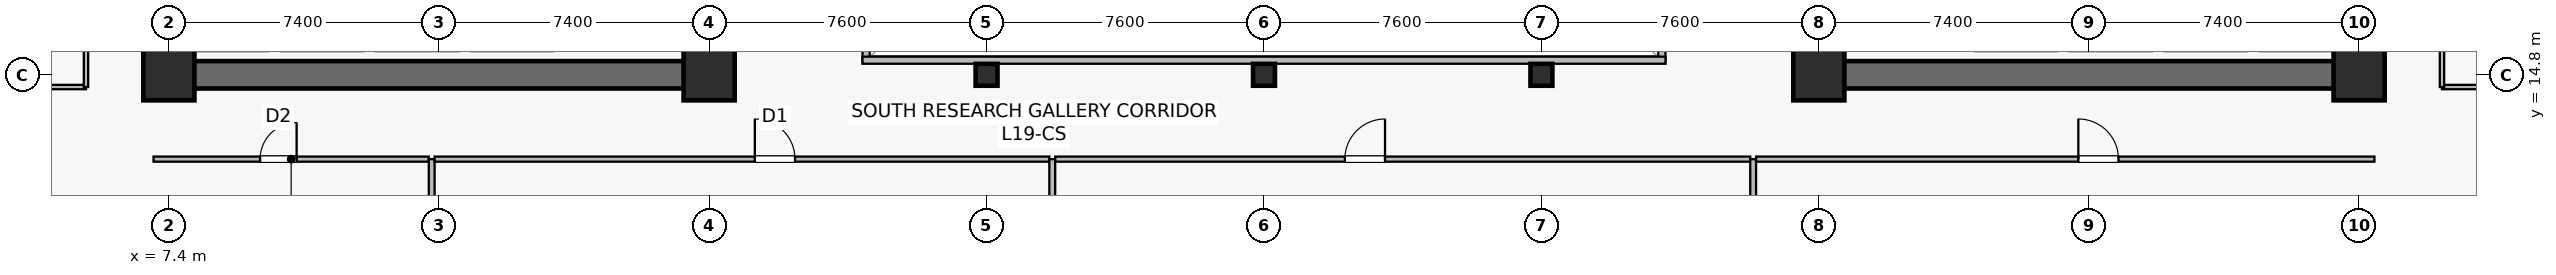
"""IFC4 building model, lengths in metres.
Left out: names, types, materials, properties, quantities, classifications, styles, units other than length and angle.
Written with IfcOpenShell. Run it as: python <this file> out.ifc"""

import sys

from ifc_helpers import new_model, si_unit, direction, frame, frame_2d, origin, origin_2d, place, context, subcontext, project, spatial, rectangle, hollow_rectangle, extrude, source, transform, mapped, element, fill, save


model = new_model("IFC4")
c1 = context("Model", 3, precision=1e-05, world=origin(), true_north=direction((0.0, 1.0)))
c2 = subcontext(c1, "Body", "Model", "MODEL_VIEW")
j1 = project(units=[si_unit("LENGTHUNIT", "METRE"), si_unit("PLANEANGLEUNIT", "RADIAN")], contexts=[c1])
p1 = place(None, origin())
s1 = spatial("IfcSite", under=j1, at=p1, CompositionType="ELEMENT")
p2 = place(p1, origin())
s2 = spatial("IfcBuilding", under=s1, at=p2, CompositionType="ELEMENT")
p3 = place(p2, frame((0.0, 0.0, 78.5)))
s3 = spatial("IfcBuildingStorey", under=s2, at=p3, CompositionType="ELEMENT", Elevation=78.5)
p4 = place(p3, frame((7.025, 14.8, 0.0), z_axis=(0.0, 0.0, 1.0), x_axis=(1.0, 0.0, 0.0)))
e1 = element("IfcWall", 1, at=p4, inside=s3, PredefinedType="SHEAR", context=c2, shape_type="SweptSolid", body=[
    extrude(rectangle(XDim=15.55, YDim=0.75, at=frame_2d((7.775, 0.0))), origin(), (0.0, 0.0, 1.0), 3.78),
])
p5 = place(p3, frame((7.4, 15.175, 0.0), z_axis=(0.0, 0.0, 1.0), x_axis=(0.0, 1.0, 0.0)))
e2 = element("IfcWall", 2, at=p5, inside=s3, PredefinedType="SHEAR", context=c2, shape_type="SweptSolid", body=[
    extrude(rectangle(XDim=18.25, YDim=0.75, at=frame_2d((9.125, 0.0))), origin(), (0.0, 0.0, 1.0), 3.78),
])
p6 = place(p3, frame((22.2, 15.175, 0.0), z_axis=(0.0, 0.0, 1.0), x_axis=(0.0, 1.0, 0.0)))
e3 = element("IfcWall", 3, at=p6, inside=s3, PredefinedType="SHEAR", context=c2, shape_type="SweptSolid", body=[
    extrude(rectangle(XDim=18.25, YDim=0.75, at=frame_2d((9.125, 0.0))), origin(), (0.0, 0.0, 1.0), 3.78),
])
p7 = place(p6, frame((3.375, 0.0, 0.0)))
e4 = element("IfcOpeningElement", 4, at=p7, cuts=e3, PredefinedType="OPENING", context=c2, shape_type="SweptSolid", body=[
    extrude(rectangle(XDim=1.42, YDim=2.2, at=frame_2d((0.71, 1.1))), frame((0.0, 0.385, 0.0), z_axis=(0.0, -1.0, 0.0), x_axis=(1.0, 0.0, 0.0)), (0.0, 0.0, 1.0), 0.77),
])
p8 = place(p3, frame((52.225, 14.8, 0.0), z_axis=(0.0, 0.0, 1.0), x_axis=(1.0, 0.0, 0.0)))
e5 = element("IfcWall", 5, at=p8, inside=s3, PredefinedType="SHEAR", context=c2, shape_type="SweptSolid", body=[
    extrude(rectangle(XDim=15.55, YDim=0.75, at=frame_2d((7.775, 0.0))), origin(), (0.0, 0.0, 1.0), 3.78),
])
p9 = place(p3, frame((52.6, 15.175, 0.0), z_axis=(0.0, 0.0, 1.0), x_axis=(0.0, 1.0, 0.0)))
e6 = element("IfcWall", 6, at=p9, inside=s3, PredefinedType="SHEAR", context=c2, shape_type="SweptSolid", body=[
    extrude(rectangle(XDim=18.25, YDim=0.75, at=frame_2d((9.125, 0.0))), origin(), (0.0, 0.0, 1.0), 3.78),
])
p10 = place(p9, frame((3.375, 0.0, 0.0)))
e7 = element("IfcOpeningElement", 7, at=p10, cuts=e6, PredefinedType="OPENING", context=c2, shape_type="SweptSolid", body=[
    extrude(rectangle(XDim=1.42, YDim=2.2, at=frame_2d((0.71, 1.1))), frame((0.0, 0.385, 0.0), z_axis=(0.0, -1.0, 0.0), x_axis=(1.0, 0.0, 0.0)), (0.0, 0.0, 1.0), 0.77),
])
p11 = place(p3, frame((67.4, 15.175, 0.0), z_axis=(0.0, 0.0, 1.0), x_axis=(0.0, 1.0, 0.0)))
e8 = element("IfcWall", 8, at=p11, inside=s3, PredefinedType="SHEAR", context=c2, shape_type="SweptSolid", body=[
    extrude(rectangle(XDim=18.25, YDim=0.75, at=frame_2d((9.125, 0.0))), origin(), (0.0, 0.0, 1.0), 3.78),
])
m1 = source(origin(), c2, "Body", "SweptSolid", [
    extrude(rectangle(XDim=1.4, YDim=1.4, at=origin_2d()), origin(), (0.0, 0.0, 1.0), 4.1),
])
for number, where, z_axis, x_axis in (
    (9, (7.4, 14.8, 0.0), (0.0, 0.0, 1.0), (1.0, 0.0, 0.0)),
    (10, (22.2, 14.8, 0.0), (0.0, 0.0, 1.0), (1.0, 0.0, 0.0)),
    (11, (52.6, 14.8, 0.0), (0.0, 0.0, 1.0), (1.0, 0.0, 0.0)),
    (12, (67.4, 14.8, 0.0), (0.0, 0.0, 1.0), (1.0, 0.0, 0.0)),
):
    element("IfcColumn", number, at=place(p3, frame(where, z_axis=z_axis, x_axis=x_axis)), inside=s3, PredefinedType="COLUMN", context=c2, shape_type="MappedRepresentation", body=[
        mapped(m1, transform((0.0, 0.0, 0.0), scale=1.0)),
    ])
m2 = source(origin(), c2, "Body", "SweptSolid", [
    extrude(hollow_rectangle(XDim=0.6, YDim=0.6, WallThickness=0.028, at=origin_2d()), origin(), (0.0, 0.0, 1.0), 4.1),
])
for number, where, z_axis, x_axis in (
    (13, (29.8, 14.8, 0.0), (0.0, 0.0, 1.0), (1.0, 0.0, 0.0)),
    (14, (37.4, 14.8, 0.0), (0.0, 0.0, 1.0), (1.0, 0.0, 0.0)),
    (15, (45.0, 14.8, 0.0), (0.0, 0.0, 1.0), (1.0, 0.0, 0.0)),
):
    element("IfcColumn", number, at=place(p3, frame(where, z_axis=z_axis, x_axis=x_axis)), inside=s3, PredefinedType="COLUMN", context=c2, shape_type="MappedRepresentation", body=[
        mapped(m2, transform((0.0, 0.0, 0.0), scale=1.0)),
    ])
p12 = place(p3, frame((26.5, 15.2, 0.0), z_axis=(0.0, 0.0, 1.0), x_axis=(0.0, 1.0, 0.0)))
e16 = element("IfcWall", 16, at=p12, inside=s3, PredefinedType="SOLIDWALL", context=c2, shape_type="SweptSolid", body=[
    extrude(rectangle(XDim=18.2, YDim=0.195, at=frame_2d((9.1, 0.0))), origin(), (0.0, 0.0, 1.0), 3.78),
])
p13 = place(p12, frame((1.8, 0.0, 0.9)))
e17 = element("IfcOpeningElement", 17, at=p13, cuts=e16, PredefinedType="OPENING", context=c2, shape_type="SweptSolid", body=[
    extrude(rectangle(XDim=1.2, YDim=1.35, at=frame_2d((0.6, 0.675))), frame((0.0, 0.107, 0.0), z_axis=(0.0, -1.0, 0.0), x_axis=(1.0, 0.0, 0.0)), (0.0, 0.0, 1.0), 0.215),
])
p14 = place(p12, frame((13.2, 0.0, 0.9)))
e18 = element("IfcOpeningElement", 18, at=p14, cuts=e16, PredefinedType="OPENING", context=c2, shape_type="SweptSolid", body=[
    extrude(rectangle(XDim=1.2, YDim=1.35, at=frame_2d((0.6, 0.675))), frame((0.0, 0.107, 0.0), z_axis=(0.0, -1.0, 0.0), x_axis=(1.0, 0.0, 0.0)), (0.0, 0.0, 1.0), 0.215),
])
p15 = place(p3, frame((48.3, 15.2, 0.0), z_axis=(0.0, 0.0, 1.0), x_axis=(0.0, 1.0, 0.0)))
e19 = element("IfcWall", 19, at=p15, inside=s3, PredefinedType="SOLIDWALL", context=c2, shape_type="SweptSolid", body=[
    extrude(rectangle(XDim=18.2, YDim=0.195, at=frame_2d((9.1, 0.0))), origin(), (0.0, 0.0, 1.0), 3.78),
])
p16 = place(p15, frame((1.8, 0.0, 0.9)))
e20 = element("IfcOpeningElement", 20, at=p16, cuts=e19, PredefinedType="OPENING", context=c2, shape_type="SweptSolid", body=[
    extrude(rectangle(XDim=1.2, YDim=1.35, at=frame_2d((0.6, 0.675))), frame((0.0, 0.107, 0.0), z_axis=(0.0, -1.0, 0.0), x_axis=(1.0, 0.0, 0.0)), (0.0, 0.0, 1.0), 0.215),
])
p17 = place(p15, frame((13.2, 0.0, 0.9)))
e21 = element("IfcOpeningElement", 21, at=p17, cuts=e19, PredefinedType="OPENING", context=c2, shape_type="SweptSolid", body=[
    extrude(rectangle(XDim=1.2, YDim=1.35, at=frame_2d((0.6, 0.675))), frame((0.0, 0.107, 0.0), z_axis=(0.0, -1.0, 0.0), x_axis=(1.0, 0.0, 0.0)), (0.0, 0.0, 1.0), 0.215),
])
p18 = place(p3, frame((26.4, 15.2, 0.0), z_axis=(0.0, 0.0, 1.0), x_axis=(1.0, 0.0, 0.0)))
e22 = element("IfcWall", 22, at=p18, inside=s3, PredefinedType="SOLIDWALL", context=c2, shape_type="SweptSolid", body=[
    extrude(rectangle(XDim=22.0, YDim=0.195, at=frame_2d((11.0, 0.0))), origin(), (0.0, 0.0, 1.0), 3.78),
])
p19 = place(p3, frame((6.98, 12.49, 0.0), z_axis=(0.0, 0.0, 1.0), x_axis=(1.0, 0.0, 0.0)))
e23 = element("IfcWall", 23, at=p19, inside=s3, PredefinedType="PARTITIONING", context=c2, shape_type="SweptSolid", body=[
    extrude(rectangle(XDim=7.54, YDim=0.14, at=frame_2d((3.77, 0.0))), origin(), (0.0, 0.0, 1.0), 3.265),
])
p20 = place(p19, frame((2.92, 0.0, 0.0)))
e24 = element("IfcOpeningElement", 24, at=p20, cuts=e23, PredefinedType="OPENING", context=c2, shape_type="SweptSolid", body=[
    extrude(rectangle(XDim=1.0, YDim=2.15, at=frame_2d((0.5, 1.075))), frame((0.0, 0.08, 0.0), z_axis=(0.0, -1.0, 0.0), x_axis=(1.0, 0.0, 0.0)), (0.0, 0.0, 1.0), 0.16),
])
p21 = place(p3, frame((14.6, 0.11, 0.0), z_axis=(0.0, 0.0, 1.0), x_axis=(0.0, 1.0, 0.0)))
e25 = element("IfcWall", 25, at=p21, inside=s3, PredefinedType="PARTITIONING", context=c2, shape_type="SweptSolid", body=[
    extrude(rectangle(XDim=12.38, YDim=0.16, at=frame_2d((6.19, 0.0))), origin(), (0.0, 0.0, 1.0), 3.015),
])
p22 = place(p3, frame((14.68, 12.49, 0.0), z_axis=(0.0, 0.0, 1.0), x_axis=(1.0, 0.0, 0.0)))
e26 = element("IfcWall", 26, at=p22, inside=s3, PredefinedType="PARTITIONING", context=c2, shape_type="SweptSolid", body=[
    extrude(rectangle(XDim=16.84, YDim=0.14, at=frame_2d((8.42, 0.0))), origin(), (0.0, 0.0, 1.0), 3.115),
])
p23 = place(p22, frame((8.772, 0.0, 0.0)))
e27 = element("IfcOpeningElement", 27, at=p23, cuts=e26, PredefinedType="OPENING", context=c2, shape_type="SweptSolid", body=[
    extrude(rectangle(XDim=1.1, YDim=2.18, at=frame_2d((0.55, 1.09))), frame((0.0, 0.08, 0.0), z_axis=(0.0, -1.0, 0.0), x_axis=(1.0, 0.0, 0.0)), (0.0, 0.0, 1.0), 0.16),
])
p24 = place(p3, frame((31.6, 1.31, 0.0), z_axis=(0.0, 0.0, 1.0), x_axis=(0.0, 1.0, 0.0)))
e28 = element("IfcWall", 28, at=p24, inside=s3, PredefinedType="PARTITIONING", context=c2, shape_type="SweptSolid", body=[
    extrude(rectangle(XDim=11.18, YDim=0.16, at=frame_2d((5.59, 0.0))), origin(), (0.0, 0.0, 1.0), 3.015),
])
p25 = place(p3, frame((31.68, 12.49, 0.0), z_axis=(0.0, 0.0, 1.0), x_axis=(1.0, 0.0, 0.0)))
e29 = element("IfcWall", 29, at=p25, inside=s3, PredefinedType="PARTITIONING", context=c2, shape_type="SweptSolid", body=[
    extrude(rectangle(XDim=19.04, YDim=0.14, at=frame_2d((9.52, 0.0))), origin(), (0.0, 0.0, 1.0), 3.115),
])
p26 = place(p25, frame((7.936, 0.0, 0.0)))
e30 = element("IfcOpeningElement", 30, at=p26, cuts=e29, PredefinedType="OPENING", context=c2, shape_type="SweptSolid", body=[
    extrude(rectangle(XDim=1.1, YDim=2.18, at=frame_2d((0.55, 1.09))), frame((0.0, 0.08, 0.0), z_axis=(0.0, -1.0, 0.0), x_axis=(1.0, 0.0, 0.0)), (0.0, 0.0, 1.0), 0.16),
])
p27 = place(p3, frame((50.8, 0.11, 0.0), z_axis=(0.0, 0.0, 1.0), x_axis=(0.0, 1.0, 0.0)))
e31 = element("IfcWall", 31, at=p27, inside=s3, PredefinedType="PARTITIONING", context=c2, shape_type="SweptSolid", body=[
    extrude(rectangle(XDim=12.38, YDim=0.16, at=frame_2d((6.19, 0.0))), origin(), (0.0, 0.0, 1.0), 3.015),
])
p28 = place(p3, frame((50.88, 12.49, 0.0), z_axis=(0.0, 0.0, 1.0), x_axis=(1.0, 0.0, 0.0)))
e32 = element("IfcWall", 32, at=p28, inside=s3, PredefinedType="PARTITIONING", context=c2, shape_type="SweptSolid", body=[
    extrude(rectangle(XDim=16.94, YDim=0.14, at=frame_2d((8.47, 0.0))), origin(), (0.0, 0.0, 1.0), 3.115),
])
p29 = place(p28, frame((8.828, 0.0, 0.0)))
e33 = element("IfcOpeningElement", 33, at=p29, cuts=e32, PredefinedType="OPENING", context=c2, shape_type="SweptSolid", body=[
    extrude(rectangle(XDim=1.1, YDim=2.18, at=frame_2d((0.55, 1.09))), frame((0.0, 0.08, 0.0), z_axis=(0.0, -1.0, 0.0), x_axis=(1.0, 0.0, 0.0)), (0.0, 0.0, 1.0), 0.16),
])
p30 = place(p3, frame((0.11, 14.465, 0.0), z_axis=(0.0, 0.0, 1.0), x_axis=(1.0, 0.0, 0.0)))
e34 = element("IfcWall", 34, at=p30, inside=s3, PredefinedType="PARTITIONING", context=c2, shape_type="SweptSolid", body=[
    extrude(rectangle(XDim=5.02, YDim=0.12, at=frame_2d((2.51, 0.0))), origin(), (0.0, 0.0, 1.0), 3.78),
])
p31 = place(p3, frame((5.13, 14.465, 0.0), z_axis=(0.0, 0.0, 1.0), x_axis=(0.0, 1.0, 0.0)))
e35 = element("IfcWall", 35, at=p31, inside=s3, PredefinedType="PARTITIONING", context=c2, shape_type="SweptSolid", body=[
    extrude(rectangle(XDim=5.875, YDim=0.12, at=frame_2d((2.938, 0.0))), origin(), (0.0, 0.0, 1.0), 3.78),
])
p32 = place(p31, frame((2.488, 0.0, 0.0)))
e36 = element("IfcOpeningElement", 36, at=p32, cuts=e35, PredefinedType="OPENING", context=c2, shape_type="SweptSolid", body=[
    extrude(rectangle(XDim=0.9, YDim=2.1, at=frame_2d((0.45, 1.05))), frame((0.0, 0.07, 0.0), z_axis=(0.0, -1.0, 0.0), x_axis=(1.0, 0.0, 0.0)), (0.0, 0.0, 1.0), 0.14),
])
p33 = place(p3, frame((69.67, 14.465, 0.0), z_axis=(0.0, 0.0, 1.0), x_axis=(1.0, 0.0, 0.0)))
e37 = element("IfcWall", 37, at=p33, inside=s3, PredefinedType="PARTITIONING", context=c2, shape_type="SweptSolid", body=[
    extrude(rectangle(XDim=5.02, YDim=0.12, at=frame_2d((2.51, 0.0))), origin(), (0.0, 0.0, 1.0), 3.78),
])
p34 = place(p3, frame((69.67, 14.465, 0.0), z_axis=(0.0, 0.0, 1.0), x_axis=(0.0, 1.0, 0.0)))
e38 = element("IfcWall", 38, at=p34, inside=s3, PredefinedType="PARTITIONING", context=c2, shape_type="SweptSolid", body=[
    extrude(rectangle(XDim=19.67, YDim=0.12, at=frame_2d((9.835, 0.0))), origin(), (0.0, 0.0, 1.0), 3.78),
])
p35 = place(p34, frame((9.385, 0.0, 0.0)))
e39 = element("IfcOpeningElement", 39, at=p35, cuts=e38, PredefinedType="OPENING", context=c2, shape_type="SweptSolid", body=[
    extrude(rectangle(XDim=0.9, YDim=2.1, at=frame_2d((0.45, 1.05))), frame((0.0, 0.07, 0.0), z_axis=(0.0, -1.0, 0.0), x_axis=(1.0, 0.0, 0.0)), (0.0, 0.0, 1.0), 0.14),
])
m3 = source(origin(), c2, "Body", "SweptSolid", [
    extrude(rectangle(XDim=1.0, YDim=2.15, at=frame_2d((0.5, 1.075))), frame((0.0, 0.025, 0.0), z_axis=(0.0, -1.0, 0.0), x_axis=(1.0, 0.0, 0.0)), (0.0, 0.0, 1.0), 0.05),
])
p36 = place(p20, origin())
e40 = element("IfcDoor", 40, at=p36, inside=s3, OperationType="SINGLE_SWING_RIGHT", PredefinedType="DOOR", context=c2, shape_type="MappedRepresentation", body=[
    mapped(m3, transform((0.0, 0.0, 0.0), scale=1.0)),
])
fill(e24, e40)
m4 = source(origin(), c2, "Body", "SweptSolid", [
    extrude(rectangle(XDim=1.1, YDim=2.18, at=frame_2d((0.55, 1.09))), frame((0.0, 0.025, 0.0), z_axis=(0.0, -1.0, 0.0), x_axis=(1.0, 0.0, 0.0)), (0.0, 0.0, 1.0), 0.05),
])
p37 = place(p23, origin())
e41 = element("IfcDoor", 41, at=p37, inside=s3, OperationType="SINGLE_SWING_LEFT", PredefinedType="DOOR", context=c2, shape_type="MappedRepresentation", body=[
    mapped(m4, transform((0.0, 0.0, 0.0), scale=1.0)),
])
fill(e27, e41)
p38 = place(p26, origin())
e42 = element("IfcDoor", 42, at=p38, inside=s3, OperationType="SINGLE_SWING_RIGHT", PredefinedType="DOOR", context=c2, shape_type="MappedRepresentation", body=[
    mapped(m4, transform((0.0, 0.0, 0.0), scale=1.0)),
])
fill(e30, e42)
p39 = place(p29, origin())
e43 = element("IfcDoor", 43, at=p39, inside=s3, OperationType="SINGLE_SWING_LEFT", PredefinedType="DOOR", context=c2, shape_type="MappedRepresentation", body=[
    mapped(m4, transform((0.0, 0.0, 0.0), scale=1.0)),
])
fill(e33, e43)
save(model, sys.argv[1])
